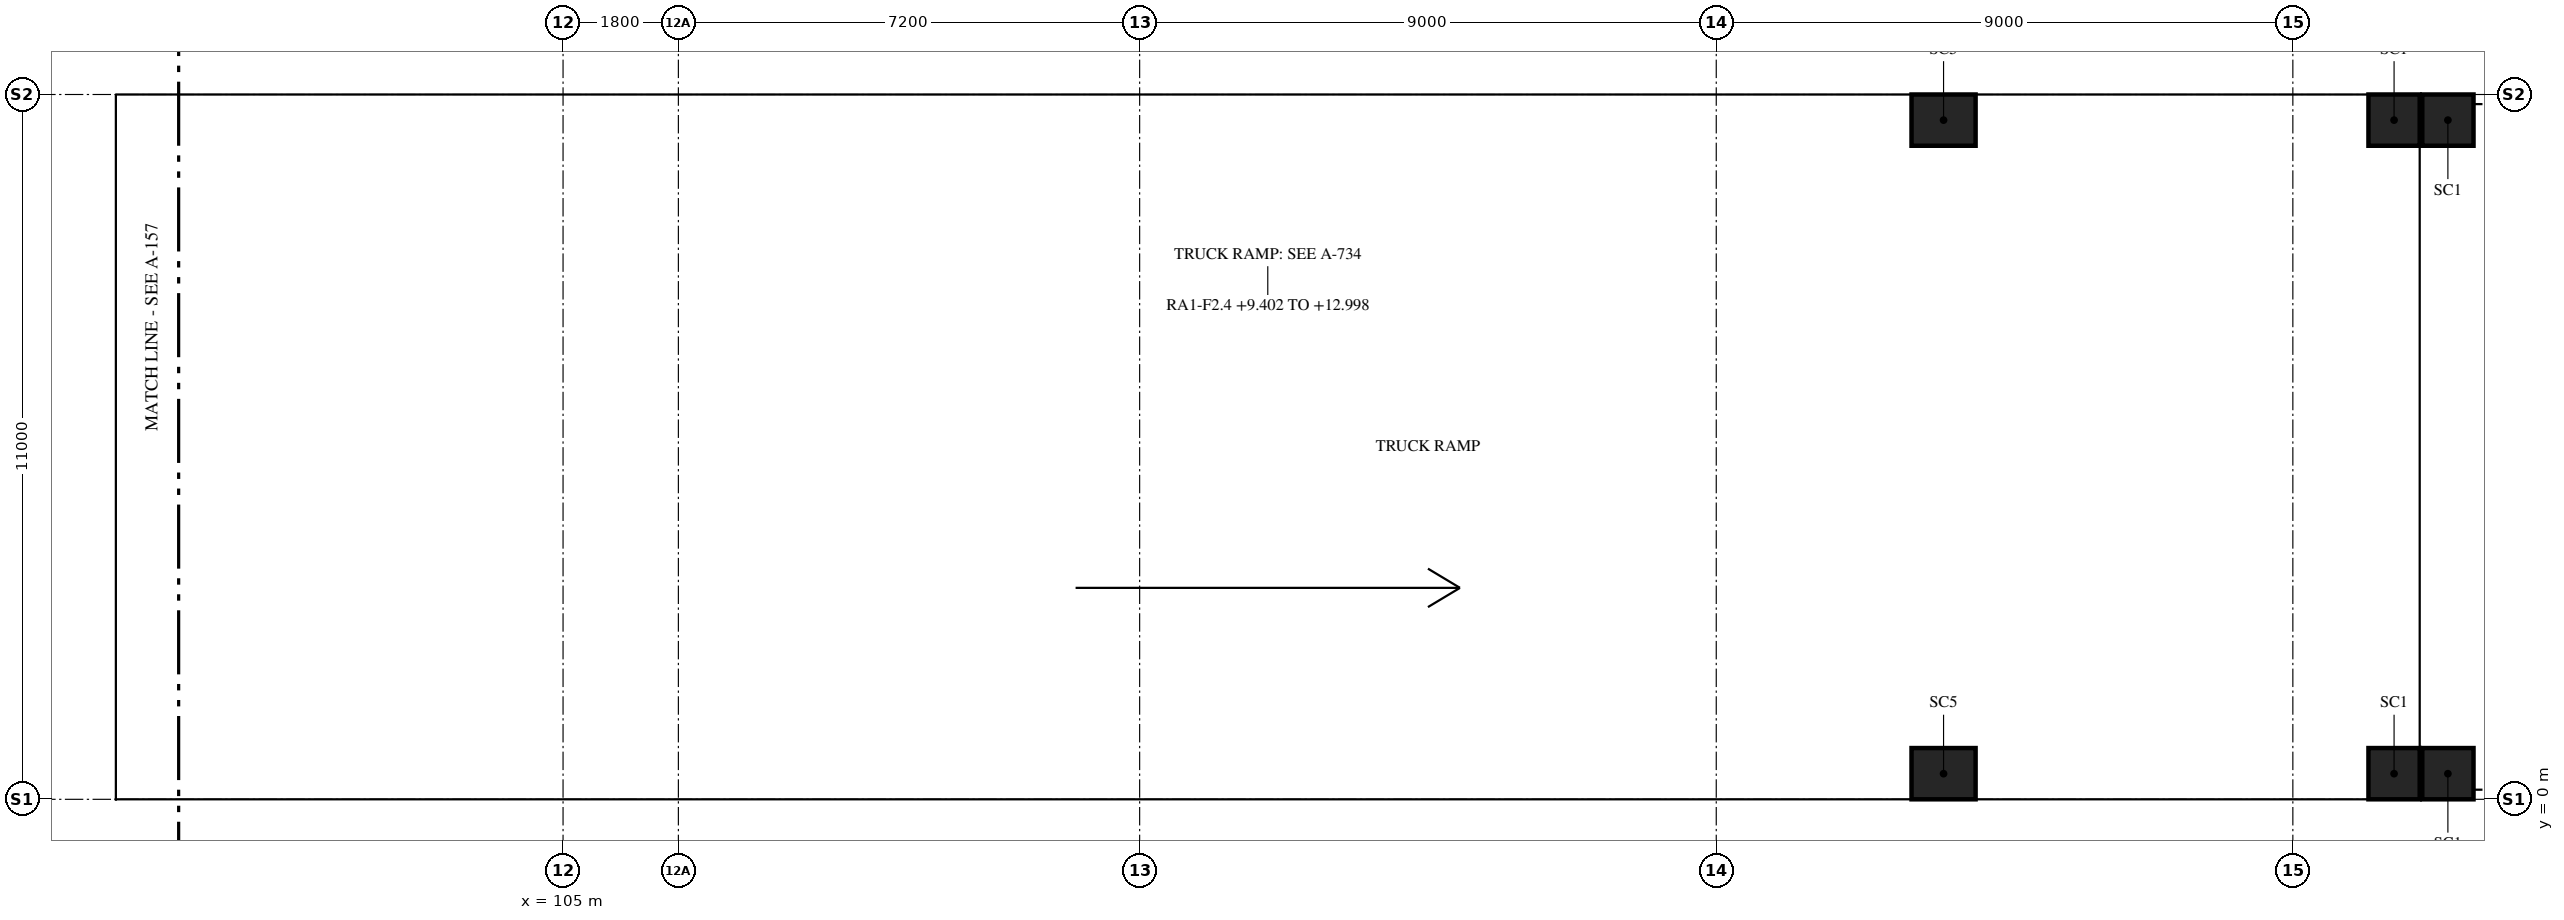
"""IFC4 building model, lengths in metres.
Left out: names, types, materials, properties, quantities, classifications, styles, units other than length and angle.
Written with IfcOpenShell. Run it as: python <this file> out.ifc"""

import sys

from ifc_helpers import new_model, si_unit, direction, frame, origin, origin_2d, place, context, subcontext, project, spatial, rectangle, extrude, element, save


model = new_model("IFC4")
c1 = context("Model", 3, precision=1e-05, world=origin(), true_north=direction((0.0, 1.0)))
c2 = subcontext(c1, "Body", "Model", "MODEL_VIEW")
j1 = project(units=[si_unit("LENGTHUNIT", "METRE"), si_unit("PLANEANGLEUNIT", "RADIAN")], contexts=[c1])
p1 = place(None, origin())
s1 = spatial("IfcSite", under=j1, at=p1, CompositionType="ELEMENT")
p2 = place(p1, origin())
s2 = spatial("IfcBuilding", under=s1, at=p2, CompositionType="ELEMENT")
p3 = place(p2, frame((0.0, 0.0, 10.0)))
s3 = spatial("IfcBuildingStorey", under=s2, at=p3, CompositionType="ELEMENT", Elevation=10.0)
for number, where, z_axis, x_axis in (
    (1, (126.548, 0.4, 0.0), (0.0, 0.0, 1.0), (1.0, 0.0, 0.0)),
    (2, (126.548, 10.6, 0.0), (0.0, 0.0, 1.0), (1.0, 0.0, 0.0)),
):
    element("IfcColumn", number, at=place(p3, frame(where, z_axis=z_axis, x_axis=x_axis)), inside=s3, PredefinedType="COLUMN", context=c2, shape_type="SweptSolid", body=[
        extrude(rectangle(XDim=1.0, YDim=0.8, at=origin_2d()), origin(), (0.0, 0.0, 1.0), 0.707),
    ])
for number, where, z_axis, x_axis in (
    (3, (133.58, 0.4, 0.0), (0.0, 0.0, 1.0), (1.0, 0.0, 0.0)),
    (4, (133.58, 10.6, 0.0), (0.0, 0.0, 1.0), (1.0, 0.0, 0.0)),
):
    element("IfcColumn", number, at=place(p3, frame(where, z_axis=z_axis, x_axis=x_axis)), inside=s3, PredefinedType="COLUMN", context=c2, shape_type="SweptSolid", body=[
        extrude(rectangle(XDim=0.8, YDim=0.8, at=origin_2d()), origin(), (0.0, 0.0, 1.0), 1.41),
    ])
for number, where, z_axis, x_axis in (
    (5, (134.42, 0.4, 0.0), (0.0, 0.0, 1.0), (1.0, 0.0, 0.0)),
    (6, (134.42, 10.6, 0.0), (0.0, 0.0, 1.0), (1.0, 0.0, 0.0)),
):
    element("IfcColumn", number, at=place(p3, frame(where, z_axis=z_axis, x_axis=x_axis)), inside=s3, PredefinedType="COLUMN", context=c2, shape_type="SweptSolid", body=[
        extrude(rectangle(XDim=0.8, YDim=0.8, at=origin_2d()), origin(), (0.0, 0.0, 1.0), 1.529),
    ])
save(model, sys.argv[1])
